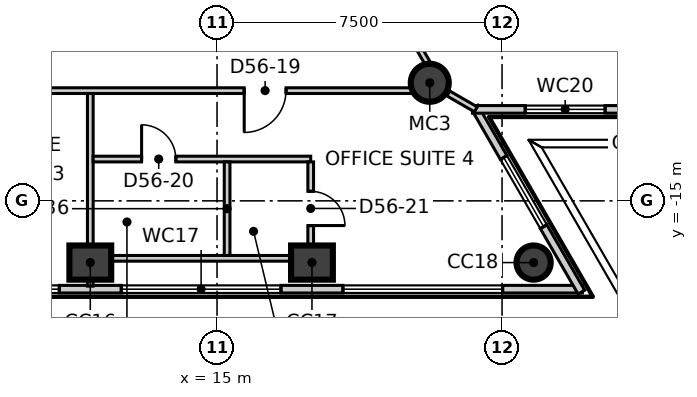
"""IFC4 building model, lengths in metres.
Left out: names, types, materials, properties, quantities, classifications, styles, units other than length and angle.
Written with IfcOpenShell. Run it as: python <this file> out.ifc"""

import sys

from ifc_helpers import new_model, si_unit, direction, frame, frame_2d, origin, origin_2d, place, context, subcontext, project, spatial, rectangle, circle, extrude, element, fill, save


model = new_model("IFC4")
c1 = context("Model", 3, precision=1e-05, world=origin(), true_north=direction((0.0, 1.0)))
c2 = subcontext(c1, "Body", "Model", "MODEL_VIEW")
j1 = project(units=[si_unit("LENGTHUNIT", "METRE"), si_unit("PLANEANGLEUNIT", "RADIAN")], contexts=[c1])
p1 = place(None, origin())
s1 = spatial("IfcSite", under=j1, at=p1, CompositionType="ELEMENT")
p2 = place(p1, origin())
s2 = spatial("IfcBuilding", under=s1, at=p2, CompositionType="ELEMENT")
p3 = place(p2, frame((0.0, 0.0, 239.3)))
s3 = spatial("IfcBuildingStorey", under=s2, at=p3, CompositionType="ELEMENT", Elevation=239.3)
for number, where, z_axis, x_axis in (
    (1, (11.665, -16.624, -0.3), (0.0, 0.0, 1.0), (1.0, 0.0, 0.0)),
    (2, (17.498, -16.624, -0.3), (0.0, 0.0, 1.0), (1.0, 0.0, 0.0)),
):
    element("IfcColumn", number, at=place(p3, frame(where, z_axis=z_axis, x_axis=x_axis)), inside=s3, PredefinedType="COLUMN", context=c2, shape_type="SweptSolid", body=[
        extrude(rectangle(XDim=1.1, YDim=0.9, at=origin_2d()), origin(), (0.0, 0.0, 1.0), 4.0),
    ])
p4 = place(p3, frame((23.33, -16.624, -0.3), z_axis=(0.0, 0.0, 1.0), x_axis=(1.0, 0.0, 0.0)))
e3 = element("IfcColumn", 3, at=p4, inside=s3, PredefinedType="COLUMN", context=c2, shape_type="SweptSolid", body=[
    extrude(circle(Radius=0.45, at=origin_2d()), origin(), (0.0, 0.0, 1.0), 4.0),
])
p5 = place(p3, frame((20.598, -11.893, -0.3), z_axis=(0.0, 0.0, 1.0), x_axis=(1.0, 0.0, 0.0)))
e4 = element("IfcColumn", 4, at=p5, inside=s3, PredefinedType="COLUMN", context=c2, shape_type="SweptSolid", body=[
    extrude(circle(Radius=0.5, at=origin_2d()), origin(), (0.0, 0.0, 1.0), 4.0),
])
p6 = place(p3, frame((-24.633, -17.324, 0.0), z_axis=(0.0, 0.0, 1.0), x_axis=(1.0, 0.0, 0.0)))
e5 = element("IfcWall", 5, at=p6, inside=s3, PredefinedType="ELEMENTEDWALL", context=c2, shape_type="SweptSolid", body=[
    extrude(rectangle(XDim=49.246, YDim=0.2, at=frame_2d((24.623, 0.0))), origin(), (0.0, 0.0, 1.0), 3.7),
])
p7 = place(p6, frame((2.119, 0.0, 0.9)))
e6 = element("IfcOpeningElement", 6, at=p7, cuts=e5, PredefinedType="OPENING", context=c2, shape_type="SweptSolid", body=[
    extrude(rectangle(XDim=4.2, YDim=2.5, at=frame_2d((2.1, 1.25))), frame((0.0, 0.11, 0.0), z_axis=(0.0, -1.0, 0.0), x_axis=(1.0, 0.0, 0.0)), (0.0, 0.0, 1.0), 0.22),
])
p8 = place(p6, frame((7.952, 0.0, 0.9)))
e7 = element("IfcOpeningElement", 7, at=p8, cuts=e5, PredefinedType="OPENING", context=c2, shape_type="SweptSolid", body=[
    extrude(rectangle(XDim=4.2, YDim=2.5, at=frame_2d((2.1, 1.25))), frame((0.0, 0.11, 0.0), z_axis=(0.0, -1.0, 0.0), x_axis=(1.0, 0.0, 0.0)), (0.0, 0.0, 1.0), 0.22),
])
p9 = place(p6, frame((13.784, 0.0, 0.9)))
e8 = element("IfcOpeningElement", 8, at=p9, cuts=e5, PredefinedType="OPENING", context=c2, shape_type="SweptSolid", body=[
    extrude(rectangle(XDim=4.2, YDim=2.5, at=frame_2d((2.1, 1.25))), frame((0.0, 0.11, 0.0), z_axis=(0.0, -1.0, 0.0), x_axis=(1.0, 0.0, 0.0)), (0.0, 0.0, 1.0), 0.22),
])
p10 = place(p6, frame((19.617, 0.0, 0.9)))
e9 = element("IfcOpeningElement", 9, at=p10, cuts=e5, PredefinedType="OPENING", context=c2, shape_type="SweptSolid", body=[
    extrude(rectangle(XDim=4.2, YDim=2.5, at=frame_2d((2.1, 1.25))), frame((0.0, 0.11, 0.0), z_axis=(0.0, -1.0, 0.0), x_axis=(1.0, 0.0, 0.0)), (0.0, 0.0, 1.0), 0.22),
])
p11 = place(p6, frame((25.449, 0.0, 0.9)))
e10 = element("IfcOpeningElement", 10, at=p11, cuts=e5, PredefinedType="OPENING", context=c2, shape_type="SweptSolid", body=[
    extrude(rectangle(XDim=4.2, YDim=2.5, at=frame_2d((2.1, 1.25))), frame((0.0, 0.11, 0.0), z_axis=(0.0, -1.0, 0.0), x_axis=(1.0, 0.0, 0.0)), (0.0, 0.0, 1.0), 0.22),
])
p12 = place(p6, frame((31.282, 0.0, 0.9)))
e11 = element("IfcOpeningElement", 11, at=p12, cuts=e5, PredefinedType="OPENING", context=c2, shape_type="SweptSolid", body=[
    extrude(rectangle(XDim=4.2, YDim=2.5, at=frame_2d((2.1, 1.25))), frame((0.0, 0.11, 0.0), z_axis=(0.0, -1.0, 0.0), x_axis=(1.0, 0.0, 0.0)), (0.0, 0.0, 1.0), 0.22),
])
p13 = place(p6, frame((37.114, 0.0, 0.9)))
e12 = element("IfcOpeningElement", 12, at=p13, cuts=e5, PredefinedType="OPENING", context=c2, shape_type="SweptSolid", body=[
    extrude(rectangle(XDim=4.2, YDim=2.5, at=frame_2d((2.1, 1.25))), frame((0.0, 0.11, 0.0), z_axis=(0.0, -1.0, 0.0), x_axis=(1.0, 0.0, 0.0)), (0.0, 0.0, 1.0), 0.22),
])
p14 = place(p6, frame((42.947, 0.0, 0.9)))
e13 = element("IfcOpeningElement", 13, at=p14, cuts=e5, PredefinedType="OPENING", context=c2, shape_type="SweptSolid", body=[
    extrude(rectangle(XDim=4.2, YDim=2.5, at=frame_2d((2.1, 1.25))), frame((0.0, 0.11, 0.0), z_axis=(0.0, -1.0, 0.0), x_axis=(1.0, 0.0, 0.0)), (0.0, 0.0, 1.0), 0.22),
])
p15 = place(p3, frame((24.588, -17.402, 0.0), z_axis=(0.0, 0.0, 1.0), x_axis=(-0.500033107516, 0.866006288307, 0.0)))
e14 = element("IfcWall", 14, at=p15, inside=s3, PredefinedType="ELEMENTEDWALL", context=c2, shape_type="SweptSolid", body=[
    extrude(rectangle(XDim=5.624, YDim=0.2, at=frame_2d((2.812, 0.0))), origin(), (0.0, 0.0, 1.0), 3.7),
])
p16 = place(p15, frame((1.99, 0.0, 0.9)))
e15 = element("IfcOpeningElement", 15, at=p16, cuts=e14, PredefinedType="OPENING", context=c2, shape_type="SweptSolid", body=[
    extrude(rectangle(XDim=2.1, YDim=2.5, at=frame_2d((1.05, 1.25))), frame((0.0, 0.11, 0.0), z_axis=(0.0, -1.0, 0.0), x_axis=(1.0, 0.0, 0.0)), (0.0, 0.0, 1.0), 0.22),
])
p17 = place(p3, frame((21.721, -12.593, 0.0), z_axis=(0.0, 0.0, 1.0), x_axis=(1.0, 0.0, 0.0)))
e16 = element("IfcWall", 16, at=p17, inside=s3, PredefinedType="ELEMENTEDWALL", context=c2, shape_type="SweptSolid", body=[
    extrude(rectangle(XDim=5.624, YDim=0.2, at=frame_2d((2.812, 0.0))), origin(), (0.0, 0.0, 1.0), 3.7),
])
p18 = place(p17, frame((1.39, 0.0, 0.9)))
e17 = element("IfcOpeningElement", 17, at=p18, cuts=e16, PredefinedType="OPENING", context=c2, shape_type="SweptSolid", body=[
    extrude(rectangle(XDim=2.1, YDim=2.5, at=frame_2d((1.05, 1.25))), frame((0.0, 0.11, 0.0), z_axis=(0.0, -1.0, 0.0), x_axis=(1.0, 0.0, 0.0)), (0.0, 0.0, 1.0), 0.22),
])
p19 = place(p3, frame((27.32, -12.671, 0.0), z_axis=(0.0, 0.0, 1.0), x_axis=(-0.499995097538, 0.866028234204, 0.0)))
e18 = element("IfcWall", 18, at=p19, inside=s3, PredefinedType="ELEMENTEDWALL", context=c2, shape_type="SweptSolid", body=[
    extrude(rectangle(XDim=49.247, YDim=0.2, at=frame_2d((24.623, 0.0))), origin(), (0.0, 0.0, 1.0), 3.7),
])
p20 = place(p19, frame((2.119, 0.0, 0.9)))
e19 = element("IfcOpeningElement", 19, at=p20, cuts=e18, PredefinedType="OPENING", context=c2, shape_type="SweptSolid", body=[
    extrude(rectangle(XDim=4.2, YDim=2.5, at=frame_2d((2.1, 1.25))), frame((0.0, 0.11, 0.0), z_axis=(0.0, -1.0, 0.0), x_axis=(1.0, 0.0, 0.0)), (0.0, 0.0, 1.0), 0.22),
])
p21 = place(p19, frame((7.952, 0.0, 0.9)))
e20 = element("IfcOpeningElement", 20, at=p21, cuts=e18, PredefinedType="OPENING", context=c2, shape_type="SweptSolid", body=[
    extrude(rectangle(XDim=4.2, YDim=2.5, at=frame_2d((2.1, 1.25))), frame((0.0, 0.11, 0.0), z_axis=(0.0, -1.0, 0.0), x_axis=(1.0, 0.0, 0.0)), (0.0, 0.0, 1.0), 0.22),
])
p22 = place(p19, frame((13.784, 0.0, 0.9)))
e21 = element("IfcOpeningElement", 21, at=p22, cuts=e18, PredefinedType="OPENING", context=c2, shape_type="SweptSolid", body=[
    extrude(rectangle(XDim=4.2, YDim=2.5, at=frame_2d((2.1, 1.25))), frame((0.0, 0.11, 0.0), z_axis=(0.0, -1.0, 0.0), x_axis=(1.0, 0.0, 0.0)), (0.0, 0.0, 1.0), 0.22),
])
p23 = place(p19, frame((19.617, 0.0, 0.9)))
e22 = element("IfcOpeningElement", 22, at=p23, cuts=e18, PredefinedType="OPENING", context=c2, shape_type="SweptSolid", body=[
    extrude(rectangle(XDim=4.2, YDim=2.5, at=frame_2d((2.1, 1.25))), frame((0.0, 0.11, 0.0), z_axis=(0.0, -1.0, 0.0), x_axis=(1.0, 0.0, 0.0)), (0.0, 0.0, 1.0), 0.22),
])
p24 = place(p19, frame((25.45, 0.0, 0.9)))
e23 = element("IfcOpeningElement", 23, at=p24, cuts=e18, PredefinedType="OPENING", context=c2, shape_type="SweptSolid", body=[
    extrude(rectangle(XDim=4.2, YDim=2.5, at=frame_2d((2.1, 1.25))), frame((0.0, 0.11, 0.0), z_axis=(0.0, -1.0, 0.0), x_axis=(1.0, 0.0, 0.0)), (0.0, 0.0, 1.0), 0.22),
])
p25 = place(p19, frame((31.282, 0.0, 0.9)))
e24 = element("IfcOpeningElement", 24, at=p25, cuts=e18, PredefinedType="OPENING", context=c2, shape_type="SweptSolid", body=[
    extrude(rectangle(XDim=4.2, YDim=2.5, at=frame_2d((2.1, 1.25))), frame((0.0, 0.11, 0.0), z_axis=(0.0, -1.0, 0.0), x_axis=(1.0, 0.0, 0.0)), (0.0, 0.0, 1.0), 0.22),
])
p26 = place(p19, frame((37.115, 0.0, 0.9)))
e25 = element("IfcOpeningElement", 25, at=p26, cuts=e18, PredefinedType="OPENING", context=c2, shape_type="SweptSolid", body=[
    extrude(rectangle(XDim=4.2, YDim=2.5, at=frame_2d((2.1, 1.25))), frame((0.0, 0.11, 0.0), z_axis=(0.0, -1.0, 0.0), x_axis=(1.0, 0.0, 0.0)), (0.0, 0.0, 1.0), 0.22),
])
p27 = place(p19, frame((42.947, 0.0, 0.9)))
e26 = element("IfcOpeningElement", 26, at=p27, cuts=e18, PredefinedType="OPENING", context=c2, shape_type="SweptSolid", body=[
    extrude(rectangle(XDim=4.2, YDim=2.5, at=frame_2d((2.1, 1.25))), frame((0.0, 0.11, 0.0), z_axis=(0.0, -1.0, 0.0), x_axis=(1.0, 0.0, 0.0)), (0.0, 0.0, 1.0), 0.22),
])
p28 = place(p3, frame((-20.807, -12.1, 0.0), z_axis=(0.0, 0.0, 1.0), x_axis=(1.0, 0.0, 0.0)))
e27 = element("IfcWall", 27, at=p28, inside=s3, PredefinedType="PARTITIONING", context=c2, shape_type="SweptSolid", body=[
    extrude(rectangle(XDim=41.764, YDim=0.15, at=frame_2d((20.882, 0.0))), origin(), (0.0, 0.0, 1.0), 3.7),
])
p29 = place(p28, frame((3.9, 0.0, 0.0)))
e28 = element("IfcOpeningElement", 28, at=p29, cuts=e27, PredefinedType="OPENING", context=c2, shape_type="SweptSolid", body=[
    extrude(rectangle(XDim=1.1, YDim=2.1, at=frame_2d((0.55, 1.05))), frame((0.0, 0.085, 0.0), z_axis=(0.0, -1.0, 0.0), x_axis=(1.0, 0.0, 0.0)), (0.0, 0.0, 1.0), 0.17),
])
p30 = place(p28, frame((18.792, 0.0, 0.0)))
e29 = element("IfcOpeningElement", 29, at=p30, cuts=e27, PredefinedType="OPENING", context=c2, shape_type="SweptSolid", body=[
    extrude(rectangle(XDim=1.1, YDim=2.1, at=frame_2d((0.55, 1.05))), frame((0.0, 0.085, 0.0), z_axis=(0.0, -1.0, 0.0), x_axis=(1.0, 0.0, 0.0)), (0.0, 0.0, 1.0), 0.17),
])
p31 = place(p28, frame((10.292, 0.0, 0.0)))
e30 = element("IfcOpeningElement", 30, at=p31, cuts=e27, PredefinedType="OPENING", context=c2, shape_type="SweptSolid", body=[
    extrude(rectangle(XDim=0.9, YDim=2.1, at=frame_2d((0.45, 1.05))), frame((0.0, 0.085, 0.0), z_axis=(0.0, -1.0, 0.0), x_axis=(1.0, 0.0, 0.0)), (0.0, 0.0, 1.0), 0.17),
])
p32 = place(p28, frame((13.492, 0.0, 0.0)))
e31 = element("IfcOpeningElement", 31, at=p32, cuts=e27, PredefinedType="OPENING", context=c2, shape_type="SweptSolid", body=[
    extrude(rectangle(XDim=0.9, YDim=2.1, at=frame_2d((0.45, 1.05))), frame((0.0, 0.085, 0.0), z_axis=(0.0, -1.0, 0.0), x_axis=(1.0, 0.0, 0.0)), (0.0, 0.0, 1.0), 0.17),
])
p33 = place(p28, frame((16.292, 0.0, 0.0)))
e32 = element("IfcOpeningElement", 32, at=p33, cuts=e27, PredefinedType="OPENING", context=c2, shape_type="SweptSolid", body=[
    extrude(rectangle(XDim=1.0, YDim=2.1, at=frame_2d((0.5, 1.05))), frame((0.0, 0.085, 0.0), z_axis=(0.0, -1.0, 0.0), x_axis=(1.0, 0.0, 0.0)), (0.0, 0.0, 1.0), 0.17),
])
p34 = place(p28, frame((29.057, 0.0, 0.0)))
e33 = element("IfcOpeningElement", 33, at=p34, cuts=e27, PredefinedType="OPENING", context=c2, shape_type="SweptSolid", body=[
    extrude(rectangle(XDim=1.1, YDim=2.1, at=frame_2d((0.55, 1.05))), frame((0.0, 0.085, 0.0), z_axis=(0.0, -1.0, 0.0), x_axis=(1.0, 0.0, 0.0)), (0.0, 0.0, 1.0), 0.17),
])
p35 = place(p28, frame((22.157, 0.0, 0.0)))
e34 = element("IfcOpeningElement", 34, at=p35, cuts=e27, PredefinedType="OPENING", context=c2, shape_type="SweptSolid", body=[
    extrude(rectangle(XDim=0.9, YDim=2.1, at=frame_2d((0.45, 1.05))), frame((0.0, 0.085, 0.0), z_axis=(0.0, -1.0, 0.0), x_axis=(1.0, 0.0, 0.0)), (0.0, 0.0, 1.0), 0.17),
])
p36 = place(p28, frame((25.157, 0.0, 0.0)))
e35 = element("IfcOpeningElement", 35, at=p36, cuts=e27, PredefinedType="OPENING", context=c2, shape_type="SweptSolid", body=[
    extrude(rectangle(XDim=0.9, YDim=2.1, at=frame_2d((0.45, 1.05))), frame((0.0, 0.085, 0.0), z_axis=(0.0, -1.0, 0.0), x_axis=(1.0, 0.0, 0.0)), (0.0, 0.0, 1.0), 0.17),
])
p37 = place(p28, frame((36.522, 0.0, 0.0)))
e36 = element("IfcOpeningElement", 36, at=p37, cuts=e27, PredefinedType="OPENING", context=c2, shape_type="SweptSolid", body=[
    extrude(rectangle(XDim=1.1, YDim=2.1, at=frame_2d((0.55, 1.05))), frame((0.0, 0.085, 0.0), z_axis=(0.0, -1.0, 0.0), x_axis=(1.0, 0.0, 0.0)), (0.0, 0.0, 1.0), 0.17),
])
p38 = place(p3, frame((21.087, -12.175, 0.0), z_axis=(0.0, 0.0, 1.0), x_axis=(0.866078617559, -0.49990781971, 0.0)))
e37 = element("IfcWall", 37, at=p38, inside=s3, PredefinedType="PARTITIONING", context=c2, shape_type="SweptSolid", body=[
    extrude(rectangle(XDim=0.836, YDim=0.15, at=frame_2d((0.418, 0.0))), origin(), (0.0, 0.0, 1.0), 3.7),
])
p39 = place(p3, frame((0.075, 24.07, 0.0), z_axis=(0.0, 0.0, 1.0), x_axis=(0.500006834213, -0.866021458014, 0.0)))
e38 = element("IfcWall", 38, at=p39, inside=s3, PredefinedType="PARTITIONING", context=c2, shape_type="SweptSolid", body=[
    extrude(rectangle(XDim=41.616, YDim=0.15, at=frame_2d((20.808, 0.0))), origin(), (0.0, 0.0, 1.0), 3.7),
])
p40 = place(p39, frame((36.616, 0.0, 0.0)))
e39 = element("IfcOpeningElement", 39, at=p40, cuts=e38, PredefinedType="OPENING", context=c2, shape_type="SweptSolid", body=[
    extrude(rectangle(XDim=1.1, YDim=2.1, at=frame_2d((0.55, 1.05))), frame((0.0, 0.085, 0.0), z_axis=(0.0, -1.0, 0.0), x_axis=(1.0, 0.0, 0.0)), (0.0, 0.0, 1.0), 0.17),
])
p41 = place(p39, frame((29.024, 0.0, 0.0)))
e40 = element("IfcOpeningElement", 40, at=p41, cuts=e38, PredefinedType="OPENING", context=c2, shape_type="SweptSolid", body=[
    extrude(rectangle(XDim=1.0, YDim=2.1, at=frame_2d((0.5, 1.05))), frame((0.0, 0.085, 0.0), z_axis=(0.0, -1.0, 0.0), x_axis=(1.0, 0.0, 0.0)), (0.0, 0.0, 1.0), 0.17),
])
p42 = place(p39, frame((23.19, 0.0, 0.0)))
e41 = element("IfcOpeningElement", 41, at=p42, cuts=e38, PredefinedType="OPENING", context=c2, shape_type="SweptSolid", body=[
    extrude(rectangle(XDim=1.0, YDim=2.1, at=frame_2d((0.5, 1.05))), frame((0.0, 0.085, 0.0), z_axis=(0.0, -1.0, 0.0), x_axis=(1.0, 0.0, 0.0)), (0.0, 0.0, 1.0), 0.17),
])
p43 = place(p39, frame((14.458, 0.0, 0.0)))
e42 = element("IfcOpeningElement", 42, at=p43, cuts=e38, PredefinedType="OPENING", context=c2, shape_type="SweptSolid", body=[
    extrude(rectangle(XDim=1.1, YDim=2.1, at=frame_2d((0.55, 1.05))), frame((0.0, 0.085, 0.0), z_axis=(0.0, -1.0, 0.0), x_axis=(1.0, 0.0, 0.0)), (0.0, 0.0, 1.0), 0.17),
])
p44 = place(p39, frame((3.993, 0.0, 0.0)))
e43 = element("IfcOpeningElement", 43, at=p44, cuts=e38, PredefinedType="OPENING", context=c2, shape_type="SweptSolid", body=[
    extrude(rectangle(XDim=1.1, YDim=2.1, at=frame_2d((0.55, 1.05))), frame((0.0, 0.085, 0.0), z_axis=(0.0, -1.0, 0.0), x_axis=(1.0, 0.0, 0.0)), (0.0, 0.0, 1.0), 0.17),
])
p45 = place(p3, frame((11.665, -17.244, 0.0), z_axis=(0.0, 0.0, 1.0), x_axis=(0.0, 1.0, 0.0)))
e44 = element("IfcWall", 44, at=p45, inside=s3, PredefinedType="PARTITIONING", context=c2, shape_type="SweptSolid", body=[
    extrude(rectangle(XDim=5.069, YDim=0.15, at=frame_2d((2.534, 0.0))), origin(), (0.0, 0.0, 1.0), 3.7),
])
p46 = place(p3, frame((11.74, -16.512, 0.0), z_axis=(0.0, 0.0, 1.0), x_axis=(1.0, 0.0, 0.0)))
e45 = element("IfcWall", 45, at=p46, inside=s3, PredefinedType="PARTITIONING", context=c2, shape_type="SweptSolid", body=[
    extrude(rectangle(XDim=5.725, YDim=0.15, at=frame_2d((2.863, 0.0))), origin(), (0.0, 0.0, 1.0), 2.95),
])
p47 = place(p3, frame((11.74, -13.9, 0.0), z_axis=(0.0, 0.0, 1.0), x_axis=(1.0, 0.0, 0.0)))
e46 = element("IfcWall", 46, at=p47, inside=s3, PredefinedType="PARTITIONING", context=c2, shape_type="SweptSolid", body=[
    extrude(rectangle(XDim=5.725, YDim=0.15, at=frame_2d((2.863, 0.0))), origin(), (0.0, 0.0, 1.0), 3.7),
])
p48 = place(p47, frame((1.275, 0.0, 0.0)))
e47 = element("IfcOpeningElement", 47, at=p48, cuts=e46, PredefinedType="OPENING", context=c2, shape_type="SweptSolid", body=[
    extrude(rectangle(XDim=0.9, YDim=2.1, at=frame_2d((0.45, 1.05))), frame((0.0, 0.085, 0.0), z_axis=(0.0, -1.0, 0.0), x_axis=(1.0, 0.0, 0.0)), (0.0, 0.0, 1.0), 0.17),
])
p49 = place(p3, frame((17.465, -16.437, 0.0), z_axis=(0.0, 0.0, 1.0), x_axis=(0.0, 1.0, 0.0)))
e48 = element("IfcWall", 48, at=p49, inside=s3, PredefinedType="PARTITIONING", context=c2, shape_type="SweptSolid", body=[
    extrude(rectangle(XDim=2.462, YDim=0.15, at=frame_2d((1.231, 0.0))), origin(), (0.0, 0.0, 1.0), 3.7),
])
p50 = place(p49, frame((0.787, 0.0, 0.0)))
e49 = element("IfcOpeningElement", 49, at=p50, cuts=e48, PredefinedType="OPENING", context=c2, shape_type="SweptSolid", body=[
    extrude(rectangle(XDim=0.9, YDim=2.1, at=frame_2d((0.45, 1.05))), frame((0.0, 0.085, 0.0), z_axis=(0.0, -1.0, 0.0), x_axis=(1.0, 0.0, 0.0)), (0.0, 0.0, 1.0), 0.17),
])
p51 = place(p3, frame((15.265, -16.437, 0.0), z_axis=(0.0, 0.0, 1.0), x_axis=(0.0, 1.0, 0.0)))
e50 = element("IfcWall", 50, at=p51, inside=s3, PredefinedType="PARTITIONING", context=c2, shape_type="SweptSolid", body=[
    extrude(rectangle(XDim=2.462, YDim=0.15, at=frame_2d((1.231, 0.0))), origin(), (0.0, 0.0, 1.0), 3.7),
])
p52 = place(p12, origin())
e51 = element("IfcWindow", 51, at=p52, inside=s3, PartitioningType="SINGLE_PANEL", PredefinedType="WINDOW", context=c2, shape_type="SweptSolid", body=[
    extrude(rectangle(XDim=4.2, YDim=2.5, at=frame_2d((2.1, 1.25))), frame((0.0, 0.03, 0.0), z_axis=(0.0, -1.0, 0.0), x_axis=(1.0, 0.0, 0.0)), (0.0, 0.0, 1.0), 0.06),
])
fill(e11, e51)
p53 = place(p13, origin())
e52 = element("IfcWindow", 52, at=p53, inside=s3, PartitioningType="SINGLE_PANEL", PredefinedType="WINDOW", context=c2, shape_type="SweptSolid", body=[
    extrude(rectangle(XDim=4.2, YDim=2.5, at=frame_2d((2.1, 1.25))), frame((0.0, 0.03, 0.0), z_axis=(0.0, -1.0, 0.0), x_axis=(1.0, 0.0, 0.0)), (0.0, 0.0, 1.0), 0.06),
])
fill(e12, e52)
p54 = place(p14, origin())
e53 = element("IfcWindow", 53, at=p54, inside=s3, PartitioningType="SINGLE_PANEL", PredefinedType="WINDOW", context=c2, shape_type="SweptSolid", body=[
    extrude(rectangle(XDim=4.2, YDim=2.5, at=frame_2d((2.1, 1.25))), frame((0.0, 0.03, 0.0), z_axis=(0.0, -1.0, 0.0), x_axis=(1.0, 0.0, 0.0)), (0.0, 0.0, 1.0), 0.06),
])
fill(e13, e53)
p55 = place(p16, origin())
e54 = element("IfcWindow", 54, at=p55, inside=s3, PartitioningType="SINGLE_PANEL", PredefinedType="WINDOW", context=c2, shape_type="SweptSolid", body=[
    extrude(rectangle(XDim=2.1, YDim=2.5, at=frame_2d((1.05, 1.25))), frame((0.0, 0.03, 0.0), z_axis=(0.0, -1.0, 0.0), x_axis=(1.0, 0.0, 0.0)), (0.0, 0.0, 1.0), 0.06),
])
fill(e15, e54)
p56 = place(p18, origin())
e55 = element("IfcWindow", 55, at=p56, inside=s3, PartitioningType="SINGLE_PANEL", PredefinedType="WINDOW", context=c2, shape_type="SweptSolid", body=[
    extrude(rectangle(XDim=2.1, YDim=2.5, at=frame_2d((1.05, 1.25))), frame((0.0, 0.03, 0.0), z_axis=(0.0, -1.0, 0.0), x_axis=(1.0, 0.0, 0.0)), (0.0, 0.0, 1.0), 0.06),
])
fill(e17, e55)
p57 = place(p37, origin())
e56 = element("IfcDoor", 56, at=p57, inside=s3, OperationType="SINGLE_SWING_LEFT", PredefinedType="DOOR", context=c2, shape_type="SweptSolid", body=[
    extrude(rectangle(XDim=1.1, YDim=2.1, at=frame_2d((0.55, 1.05))), frame((0.0, 0.025, 0.0), z_axis=(0.0, -1.0, 0.0), x_axis=(1.0, 0.0, 0.0)), (0.0, 0.0, 1.0), 0.05),
])
fill(e36, e56)
p58 = place(p48, origin())
e57 = element("IfcDoor", 57, at=p58, inside=s3, OperationType="SINGLE_SWING_RIGHT", PredefinedType="DOOR", context=c2, shape_type="SweptSolid", body=[
    extrude(rectangle(XDim=0.9, YDim=2.1, at=frame_2d((0.45, 1.05))), frame((0.0, 0.025, 0.0), z_axis=(0.0, -1.0, 0.0), x_axis=(1.0, 0.0, 0.0)), (0.0, 0.0, 1.0), 0.05),
])
fill(e47, e57)
p59 = place(p50, origin())
e58 = element("IfcDoor", 58, at=p59, inside=s3, OperationType="SINGLE_SWING_LEFT", PredefinedType="DOOR", context=c2, shape_type="SweptSolid", body=[
    extrude(rectangle(XDim=0.9, YDim=2.1, at=frame_2d((0.45, 1.05))), frame((0.0, 0.025, 0.0), z_axis=(0.0, -1.0, 0.0), x_axis=(1.0, 0.0, 0.0)), (0.0, 0.0, 1.0), 0.05),
])
fill(e49, e58)
save(model, sys.argv[1])
